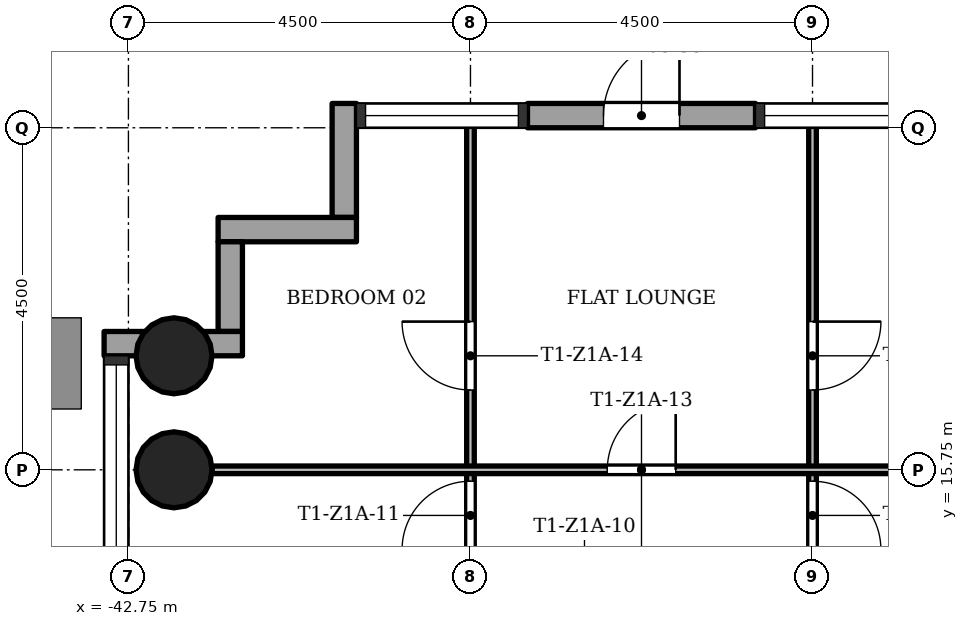
"""IFC4 building model, lengths in metres.
Left out: names, types, materials, properties, quantities, classifications, styles, units other than length and angle.
Written with IfcOpenShell. Run it as: python <this file> out.ifc"""

import sys

from ifc_helpers import new_model, si_unit, direction, frame, frame_2d, origin, origin_2d, place, context, subcontext, project, spatial, rectangle, hollow_circle, extrude, element, fill, save


model = new_model("IFC4")
c1 = context("Model", 3, precision=1e-05, world=origin(), true_north=direction((0.0, 1.0)))
c2 = subcontext(c1, "Body", "Model", "MODEL_VIEW")
j1 = project(units=[si_unit("LENGTHUNIT", "METRE"), si_unit("PLANEANGLEUNIT", "RADIAN")], contexts=[c1])
p1 = place(None, origin())
s1 = spatial("IfcSite", under=j1, at=p1, CompositionType="ELEMENT")
p2 = place(p1, origin())
s2 = spatial("IfcBuilding", under=s1, at=p2, CompositionType="ELEMENT")
p3 = place(p2, frame((0.0, 0.0, 24.5)))
s3 = spatial("IfcBuildingStorey", under=s2, at=p3, CompositionType="ELEMENT", Elevation=24.5)
for number, where, z_axis, x_axis in (
    (1, (-42.15, 15.75, 0.0), (0.0, 0.0, 1.0), (1.0, 0.0, 0.0)),
    (2, (-42.15, 17.25, 0.0), (0.0, 0.0, 1.0), (1.0, 0.0, 0.0)),
):
    element("IfcColumn", number, at=place(p3, frame(where, z_axis=z_axis, x_axis=x_axis)), inside=s3, PredefinedType="COLUMN", context=c2, shape_type="SweptSolid", body=[
        extrude(hollow_circle(Radius=0.5, WallThickness=0.036, at=origin_2d()), origin(), (0.0, 0.0, 1.0), 3.4),
    ])
p4 = place(p3, frame((-34.5, 20.41, 0.0), z_axis=(0.0, 0.0, 1.0), x_axis=(-1.0, 0.0, 0.0)))
e3 = element("IfcWall", 3, at=p4, inside=s3, PredefinedType="STANDARD", context=c2, shape_type="SweptSolid", body=[
    extrude(rectangle(XDim=3.0, YDim=0.32, at=frame_2d((1.5, 0.0))), origin(), (0.0, 0.0, 1.0), 3.1),
])
p5 = place(p4, frame((1.0, 0.0, 0.0)))
e4 = element("IfcOpeningElement", 4, at=p5, cuts=e3, PredefinedType="OPENING", context=c2, shape_type="SweptSolid", body=[
    extrude(rectangle(XDim=1.0, YDim=2.1, at=frame_2d((0.5, 1.05))), frame((0.0, 0.17, 0.0), z_axis=(0.0, -1.0, 0.0), x_axis=(1.0, 0.0, 0.0)), (0.0, 0.0, 1.0), 0.34),
])
p6 = place(p3, frame((-39.91, 20.57, 0.0), z_axis=(0.0, 0.0, 1.0), x_axis=(0.0, -1.0, 0.0)))
e5 = element("IfcWall", 5, at=p6, inside=s3, PredefinedType="STANDARD", context=c2, shape_type="SweptSolid", body=[
    extrude(rectangle(XDim=1.5, YDim=0.32, at=frame_2d((0.75, 0.0))), origin(), (0.0, 0.0, 1.0), 3.1),
])
p7 = place(p3, frame((-39.75, 18.91, 0.0), z_axis=(0.0, 0.0, 1.0), x_axis=(-1.0, 0.0, 0.0)))
e6 = element("IfcWall", 6, at=p7, inside=s3, PredefinedType="STANDARD", context=c2, shape_type="SweptSolid", body=[
    extrude(rectangle(XDim=1.82, YDim=0.32, at=frame_2d((0.91, 0.0))), origin(), (0.0, 0.0, 1.0), 3.1),
])
p8 = place(p3, frame((-41.41, 18.75, 0.0), z_axis=(0.0, 0.0, 1.0), x_axis=(0.0, -1.0, 0.0)))
e7 = element("IfcWall", 7, at=p8, inside=s3, PredefinedType="STANDARD", context=c2, shape_type="SweptSolid", body=[
    extrude(rectangle(XDim=1.18, YDim=0.32, at=frame_2d((0.59, 0.0))), origin(), (0.0, 0.0, 1.0), 3.1),
])
p9 = place(p3, frame((-41.25, 17.41, 0.0), z_axis=(0.0, 0.0, 1.0), x_axis=(-1.0, 0.0, 0.0)))
e8 = element("IfcWall", 8, at=p9, inside=s3, PredefinedType="STANDARD", context=c2, shape_type="SweptSolid", body=[
    extrude(rectangle(XDim=1.82, YDim=0.32, at=frame_2d((0.91, 0.0))), origin(), (0.0, 0.0, 1.0), 3.1),
])
p10 = place(p3, frame((-38.25, 11.25, 0.0), z_axis=(0.0, 0.0, 1.0), x_axis=(0.0, 1.0, 0.0)))
e9 = element("IfcWall", 9, at=p10, inside=s3, PredefinedType="PARTITIONING", context=c2, shape_type="SweptSolid", body=[
    extrude(rectangle(XDim=9.1, YDim=0.1, at=frame_2d((4.55, 0.0))), origin(), (0.0, 0.0, 1.0), 3.0),
])
p11 = place(p10, frame((3.45, 0.0, 0.0)))
e10 = element("IfcOpeningElement", 10, at=p11, cuts=e9, PredefinedType="OPENING", context=c2, shape_type="SweptSolid", body=[
    extrude(rectangle(XDim=0.9, YDim=2.1, at=frame_2d((0.45, 1.05))), frame((0.0, 0.06, 0.0), z_axis=(0.0, -1.0, 0.0), x_axis=(1.0, 0.0, 0.0)), (0.0, 0.0, 1.0), 0.12),
])
p12 = place(p10, frame((5.55, 0.0, 0.0)))
e11 = element("IfcOpeningElement", 11, at=p12, cuts=e9, PredefinedType="OPENING", context=c2, shape_type="SweptSolid", body=[
    extrude(rectangle(XDim=0.9, YDim=2.1, at=frame_2d((0.45, 1.05))), frame((0.0, 0.06, 0.0), z_axis=(0.0, -1.0, 0.0), x_axis=(1.0, 0.0, 0.0)), (0.0, 0.0, 1.0), 0.12),
])
p13 = place(p3, frame((-33.75, 11.25, 0.0), z_axis=(0.0, 0.0, 1.0), x_axis=(0.0, 1.0, 0.0)))
e12 = element("IfcWall", 12, at=p13, inside=s3, PredefinedType="PARTITIONING", context=c2, shape_type="SweptSolid", body=[
    extrude(rectangle(XDim=9.1, YDim=0.1, at=frame_2d((4.55, 0.0))), origin(), (0.0, 0.0, 1.0), 3.0),
])
p14 = place(p13, frame((3.45, 0.0, 0.0)))
e13 = element("IfcOpeningElement", 13, at=p14, cuts=e12, PredefinedType="OPENING", context=c2, shape_type="SweptSolid", body=[
    extrude(rectangle(XDim=0.9, YDim=2.1, at=frame_2d((0.45, 1.05))), frame((0.0, 0.06, 0.0), z_axis=(0.0, -1.0, 0.0), x_axis=(1.0, 0.0, 0.0)), (0.0, 0.0, 1.0), 0.12),
])
p15 = place(p13, frame((5.55, 0.0, 0.0)))
e14 = element("IfcOpeningElement", 14, at=p15, cuts=e12, PredefinedType="OPENING", context=c2, shape_type="SweptSolid", body=[
    extrude(rectangle(XDim=0.9, YDim=2.1, at=frame_2d((0.45, 1.05))), frame((0.0, 0.06, 0.0), z_axis=(0.0, -1.0, 0.0), x_axis=(1.0, 0.0, 0.0)), (0.0, 0.0, 1.0), 0.12),
])
p16 = place(p3, frame((-41.65, 15.75, 0.0), z_axis=(0.0, 0.0, 1.0), x_axis=(1.0, 0.0, 0.0)))
e15 = element("IfcWall", 15, at=p16, inside=s3, PredefinedType="PARTITIONING", context=c2, shape_type="SweptSolid", body=[
    extrude(rectangle(XDim=11.3, YDim=0.1, at=frame_2d((5.65, 0.0))), origin(), (0.0, 0.0, 1.0), 3.0),
])
p17 = place(p16, frame((5.2, 0.0, 0.0)))
e16 = element("IfcOpeningElement", 16, at=p17, cuts=e15, PredefinedType="OPENING", context=c2, shape_type="SweptSolid", body=[
    extrude(rectangle(XDim=0.9, YDim=2.1, at=frame_2d((0.45, 1.05))), frame((0.0, 0.06, 0.0), z_axis=(0.0, -1.0, 0.0), x_axis=(1.0, 0.0, 0.0)), (0.0, 0.0, 1.0), 0.12),
])
p18 = place(p5, origin())
e17 = element("IfcDoor", 17, at=p18, inside=s3, OperationType="SINGLE_SWING_LEFT", PredefinedType="DOOR", context=c2, shape_type="SweptSolid", body=[
    extrude(rectangle(XDim=1.0, YDim=2.1, at=frame_2d((0.5, 1.05))), frame((0.0, 0.025, 0.0), z_axis=(0.0, -1.0, 0.0), x_axis=(1.0, 0.0, 0.0)), (0.0, 0.0, 1.0), 0.05),
])
fill(e4, e17)
p19 = place(p11, origin())
e18 = element("IfcDoor", 18, at=p19, inside=s3, OperationType="SINGLE_SWING_RIGHT", PredefinedType="DOOR", context=c2, shape_type="SweptSolid", body=[
    extrude(rectangle(XDim=0.9, YDim=2.1, at=frame_2d((0.45, 1.05))), frame((0.0, 0.025, 0.0), z_axis=(0.0, -1.0, 0.0), x_axis=(1.0, 0.0, 0.0)), (0.0, 0.0, 1.0), 0.05),
])
fill(e10, e18)
p20 = place(p14, origin())
e19 = element("IfcDoor", 19, at=p20, inside=s3, OperationType="SINGLE_SWING_LEFT", PredefinedType="DOOR", context=c2, shape_type="SweptSolid", body=[
    extrude(rectangle(XDim=0.9, YDim=2.1, at=frame_2d((0.45, 1.05))), frame((0.0, 0.025, 0.0), z_axis=(0.0, -1.0, 0.0), x_axis=(1.0, 0.0, 0.0)), (0.0, 0.0, 1.0), 0.05),
])
fill(e13, e19)
p21 = place(p17, origin())
e20 = element("IfcDoor", 20, at=p21, inside=s3, OperationType="SINGLE_SWING_LEFT", PredefinedType="DOOR", context=c2, shape_type="SweptSolid", body=[
    extrude(rectangle(XDim=0.9, YDim=2.1, at=frame_2d((0.45, 1.05))), frame((0.0, 0.025, 0.0), z_axis=(0.0, -1.0, 0.0), x_axis=(1.0, 0.0, 0.0)), (0.0, 0.0, 1.0), 0.05),
])
fill(e16, e20)
p22 = place(p12, origin())
e21 = element("IfcDoor", 21, at=p22, inside=s3, OperationType="SINGLE_SWING_LEFT", PredefinedType="DOOR", context=c2, shape_type="SweptSolid", body=[
    extrude(rectangle(XDim=0.9, YDim=2.1, at=frame_2d((0.45, 1.05))), frame((0.0, 0.025, 0.0), z_axis=(0.0, -1.0, 0.0), x_axis=(1.0, 0.0, 0.0)), (0.0, 0.0, 1.0), 0.05),
])
fill(e11, e21)
p23 = place(p15, origin())
e22 = element("IfcDoor", 22, at=p23, inside=s3, OperationType="SINGLE_SWING_RIGHT", PredefinedType="DOOR", context=c2, shape_type="SweptSolid", body=[
    extrude(rectangle(XDim=0.9, YDim=2.1, at=frame_2d((0.45, 1.05))), frame((0.0, 0.025, 0.0), z_axis=(0.0, -1.0, 0.0), x_axis=(1.0, 0.0, 0.0)), (0.0, 0.0, 1.0), 0.05),
])
fill(e14, e22)
save(model, sys.argv[1])
